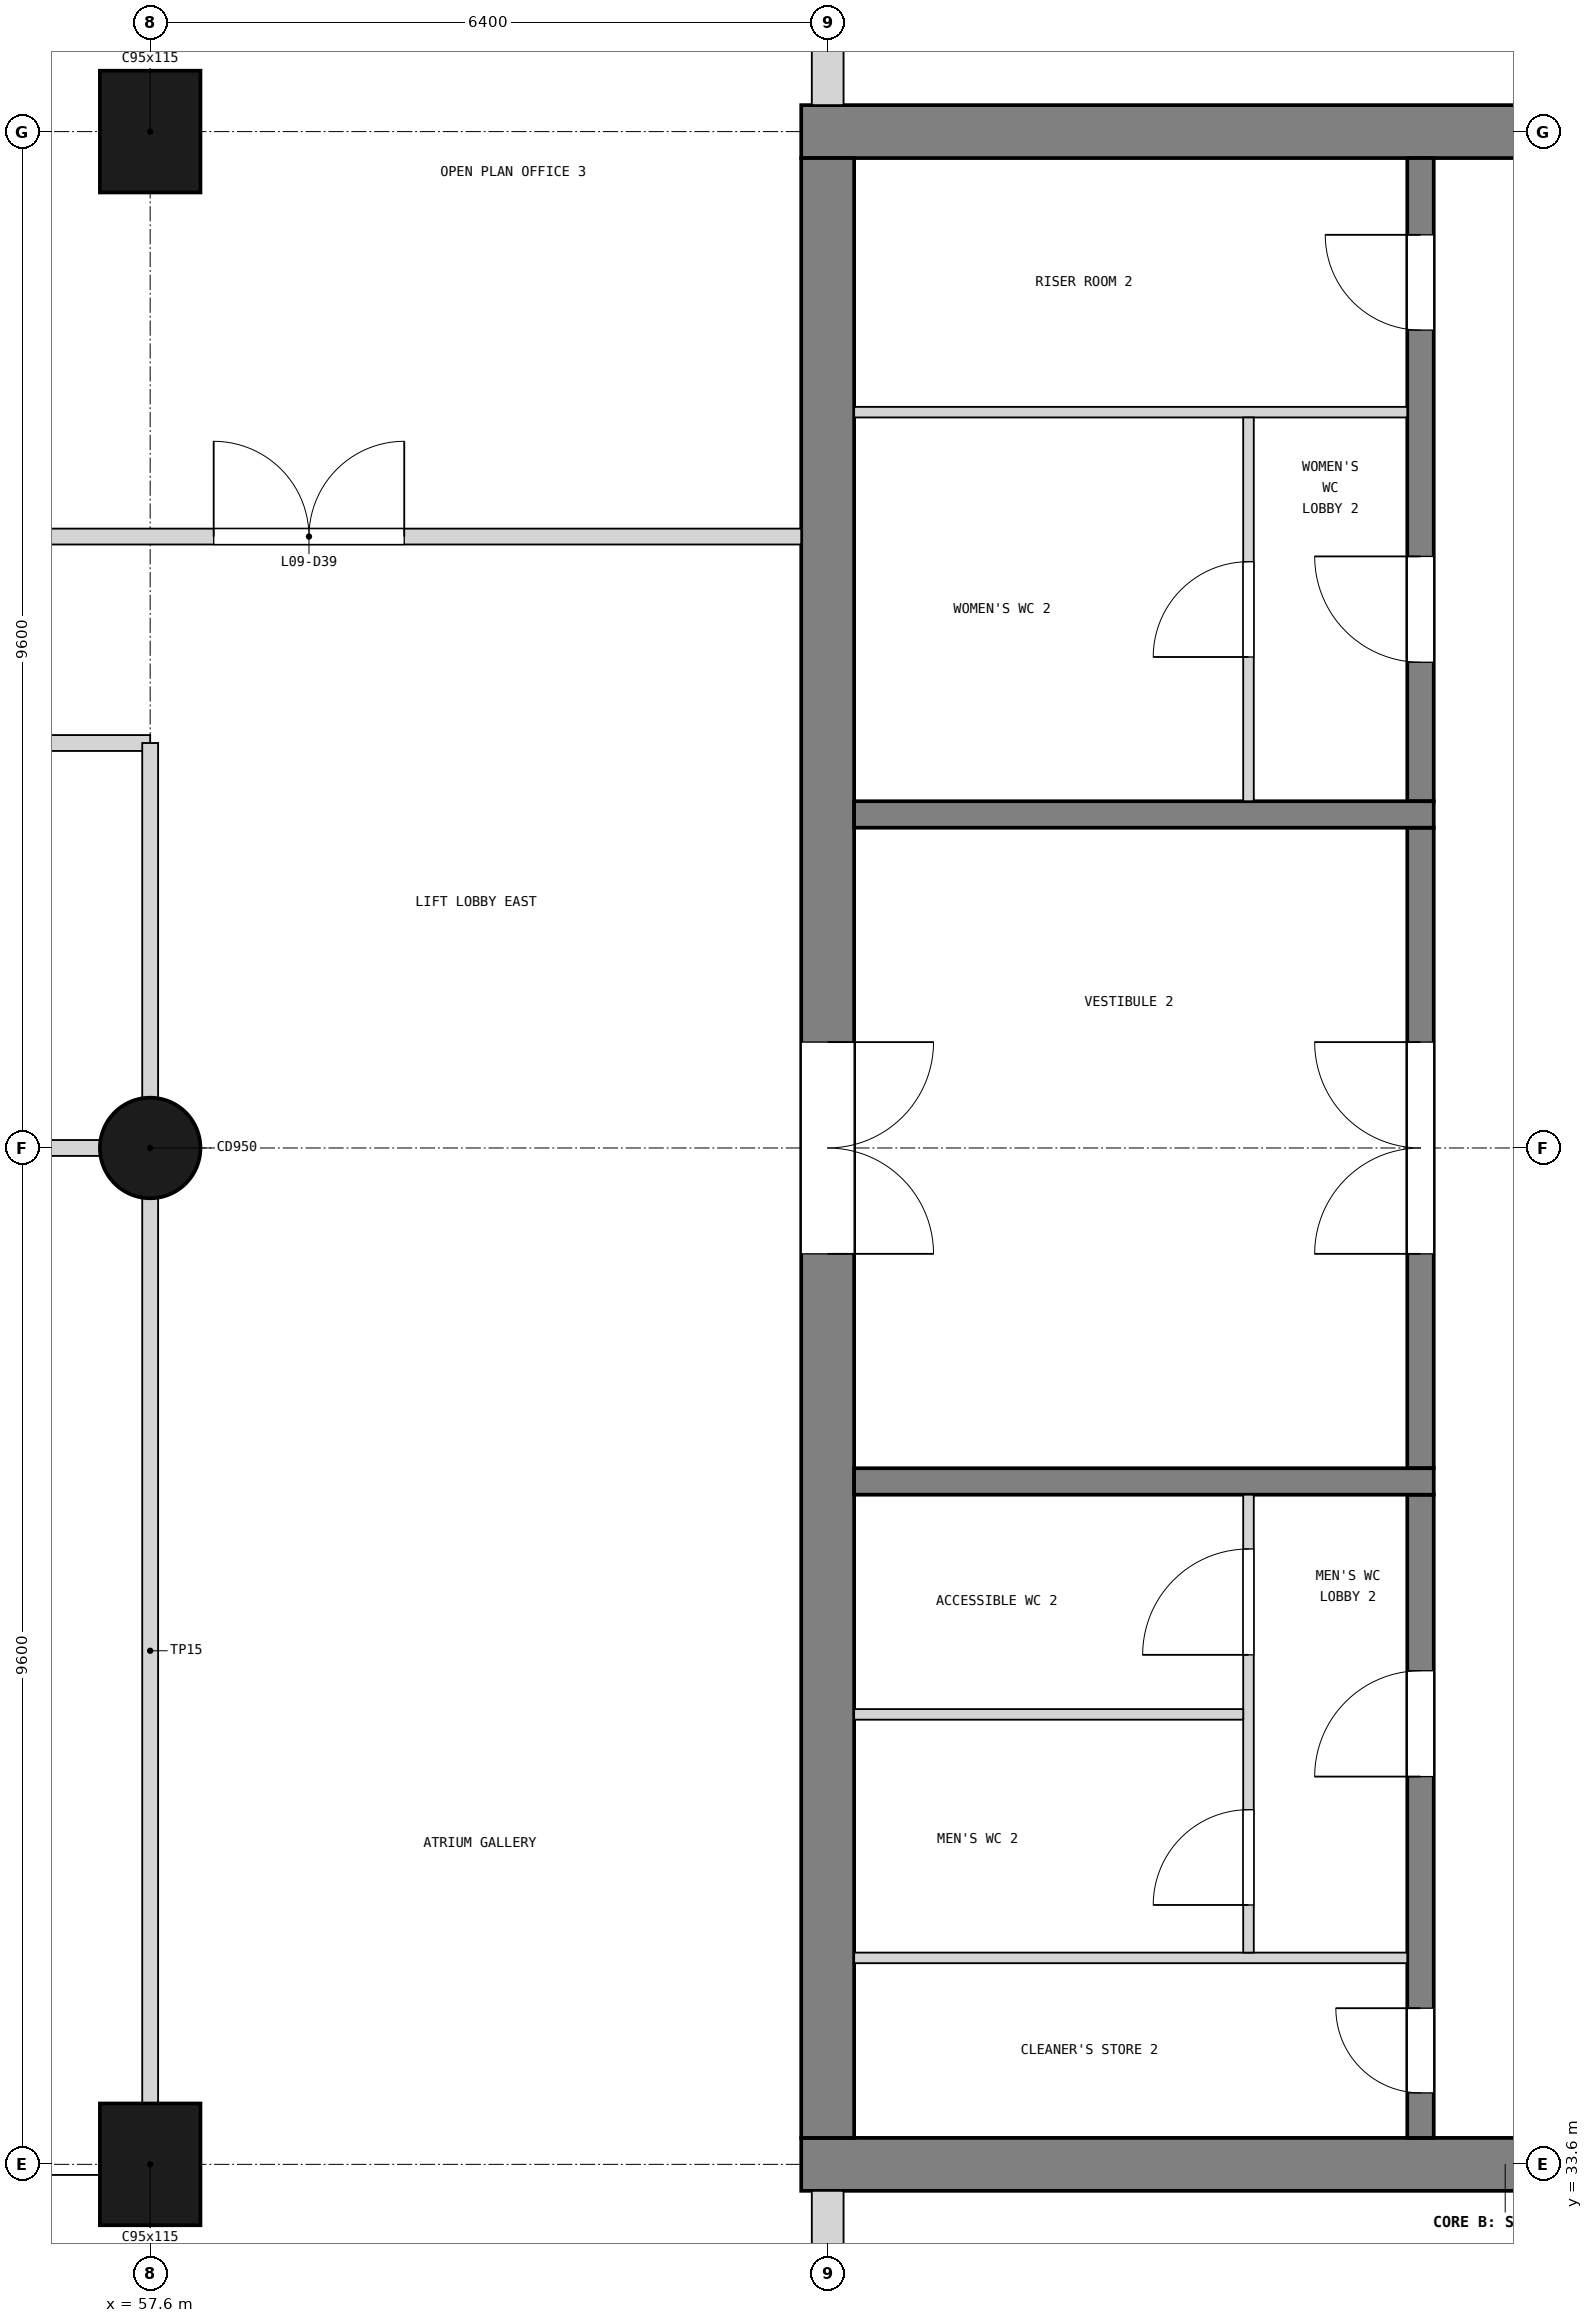
"""IFC4 building model, lengths in metres.
Left out: names, types, materials, properties, quantities, classifications, styles, units other than length and angle.
Written with IfcOpenShell. Run it as: python <this file> out.ifc"""

import sys

from ifc_helpers import new_model, si_unit, direction, frame, frame_2d, origin, origin_2d, place, context, subcontext, project, spatial, rectangle, circle, extrude, element, fill, save


model = new_model("IFC4")
c1 = context("Model", 3, precision=1e-05, world=origin(), true_north=direction((0.0, 1.0)))
c2 = subcontext(c1, "Body", "Model", "MODEL_VIEW")
j1 = project(units=[si_unit("LENGTHUNIT", "METRE"), si_unit("PLANEANGLEUNIT", "RADIAN")], contexts=[c1])
p1 = place(None, origin())
s1 = spatial("IfcSite", under=j1, at=p1, CompositionType="ELEMENT")
p2 = place(p1, origin())
s2 = spatial("IfcBuilding", under=s1, at=p2, CompositionType="ELEMENT")
p3 = place(p2, frame((0.0, 0.0, 36.6)))
s3 = spatial("IfcBuildingStorey", under=s2, at=p3, CompositionType="ELEMENT", Elevation=36.6)
p4 = place(p3, frame((63.75, 52.8, 0.0), z_axis=(0.0, 0.0, 1.0), x_axis=(1.0, 0.0, 0.0)))
e1 = element("IfcWall", 1, at=p4, inside=s3, PredefinedType="SHEAR", context=c2, shape_type="SweptSolid", body=[
    extrude(rectangle(XDim=13.3, YDim=0.5, at=frame_2d((6.65, 0.0))), origin(), (0.0, 0.0, 1.0), 3.9),
])
p5 = place(p4, frame((11.05, 0.0, 1.0)))
e2 = element("IfcOpeningElement", 2, at=p5, cuts=e1, PredefinedType="OPENING", context=c2, shape_type="SweptSolid", body=[
    extrude(rectangle(XDim=0.4, YDim=2.0, at=frame_2d((0.2, 1.0))), frame((0.0, 0.26, 0.0), z_axis=(0.0, -1.0, 0.0), x_axis=(1.0, 0.0, 0.0)), (0.0, 0.0, 1.0), 0.52),
])
p6 = place(p3, frame((63.75, 33.6, 0.0), z_axis=(0.0, 0.0, 1.0), x_axis=(1.0, 0.0, 0.0)))
e3 = element("IfcWall", 3, at=p6, inside=s3, PredefinedType="SHEAR", context=c2, shape_type="SweptSolid", body=[
    extrude(rectangle(XDim=13.3, YDim=0.5, at=frame_2d((6.65, 0.0))), origin(), (0.0, 0.0, 1.0), 3.9),
])
p7 = place(p6, frame((11.05, 0.0, 1.0)))
e4 = element("IfcOpeningElement", 4, at=p7, cuts=e3, PredefinedType="OPENING", context=c2, shape_type="SweptSolid", body=[
    extrude(rectangle(XDim=0.4, YDim=2.0, at=frame_2d((0.2, 1.0))), frame((0.0, 0.26, 0.0), z_axis=(0.0, -1.0, 0.0), x_axis=(1.0, 0.0, 0.0)), (0.0, 0.0, 1.0), 0.52),
])
p8 = place(p3, frame((64.0, 33.85, 0.0), z_axis=(0.0, 0.0, 1.0), x_axis=(0.0, 1.0, 0.0)))
e5 = element("IfcWall", 5, at=p8, inside=s3, PredefinedType="SHEAR", context=c2, shape_type="SweptSolid", body=[
    extrude(rectangle(XDim=18.7, YDim=0.5, at=frame_2d((9.35, 0.0))), origin(), (0.0, 0.0, 1.0), 3.9),
])
p9 = place(p8, frame((8.35, 0.0, 0.0)))
e6 = element("IfcOpeningElement", 6, at=p9, cuts=e5, PredefinedType="OPENING", context=c2, shape_type="SweptSolid", body=[
    extrude(rectangle(XDim=2.0, YDim=2.1, at=frame_2d((1.0, 1.05))), frame((0.0, 0.26, 0.0), z_axis=(0.0, -1.0, 0.0), x_axis=(1.0, 0.0, 0.0)), (0.0, 0.0, 1.0), 0.52),
])
p10 = place(p3, frame((57.6, 33.6, 0.0), z_axis=(0.0, 0.0, 1.0), x_axis=(1.0, 0.0, 0.0)))
e7 = element("IfcColumn", 7, at=p10, inside=s3, PredefinedType="COLUMN", context=c2, shape_type="SweptSolid", body=[
    extrude(rectangle(XDim=0.95, YDim=1.15, at=origin_2d()), origin(), (0.0, 0.0, 1.0), 3.9),
])
p11 = place(p3, frame((57.6, 43.2, 0.0), z_axis=(0.0, 0.0, 1.0), x_axis=(1.0, 0.0, 0.0)))
e8 = element("IfcColumn", 8, at=p11, inside=s3, PredefinedType="COLUMN", context=c2, shape_type="SweptSolid", body=[
    extrude(circle(Radius=0.475, at=origin_2d()), origin(), (0.0, 0.0, 1.0), 3.9),
])
p12 = place(p3, frame((57.6, 52.8, 0.0), z_axis=(0.0, 0.0, 1.0), x_axis=(1.0, 0.0, 0.0)))
e9 = element("IfcColumn", 9, at=p12, inside=s3, PredefinedType="COLUMN", context=c2, shape_type="SweptSolid", body=[
    extrude(rectangle(XDim=0.95, YDim=1.15, at=origin_2d()), origin(), (0.0, 0.0, 1.0), 3.9),
])
p13 = place(p3, frame((64.0, 31.0, 0.0), z_axis=(0.0, 0.0, 1.0), x_axis=(0.0, 1.0, 0.0)))
e10 = element("IfcWall", 10, at=p13, inside=s3, PredefinedType="SOLIDWALL", context=c2, shape_type="SweptSolid", body=[
    extrude(rectangle(XDim=2.35, YDim=0.3, at=frame_2d((1.175, 0.0))), origin(), (0.0, 0.0, 1.0), 2.88),
])
p14 = place(p3, frame((64.0, 53.05, 0.0), z_axis=(0.0, 0.0, 1.0), x_axis=(0.0, 1.0, 0.0)))
e11 = element("IfcWall", 11, at=p14, inside=s3, PredefinedType="SOLIDWALL", context=c2, shape_type="SweptSolid", body=[
    extrude(rectangle(XDim=2.35, YDim=0.3, at=frame_2d((1.175, 0.0))), origin(), (0.0, 0.0, 1.0), 2.88),
])
p15 = place(p3, frame((69.6, 33.85, 0.0), z_axis=(0.0, 0.0, 1.0), x_axis=(0.0, 1.0, 0.0)))
e12 = element("IfcWall", 12, at=p15, inside=s3, PredefinedType="SOLIDWALL", context=c2, shape_type="SweptSolid", body=[
    extrude(rectangle(XDim=6.075, YDim=0.25, at=frame_2d((3.038, 0.0))), origin(), (0.0, 0.0, 1.0), 3.6),
])
p16 = place(p15, frame((0.425, 0.0, 0.0)))
e13 = element("IfcOpeningElement", 13, at=p16, cuts=e12, PredefinedType="OPENING", context=c2, shape_type="SweptSolid", body=[
    extrude(rectangle(XDim=0.8, YDim=2.1, at=frame_2d((0.4, 1.05))), frame((0.0, 0.135, 0.0), z_axis=(0.0, -1.0, 0.0), x_axis=(1.0, 0.0, 0.0)), (0.0, 0.0, 1.0), 0.27),
])
p17 = place(p15, frame((3.413, 0.0, 0.0)))
e14 = element("IfcOpeningElement", 14, at=p17, cuts=e12, PredefinedType="OPENING", context=c2, shape_type="SweptSolid", body=[
    extrude(rectangle(XDim=1.0, YDim=2.1, at=frame_2d((0.5, 1.05))), frame((0.0, 0.135, 0.0), z_axis=(0.0, -1.0, 0.0), x_axis=(1.0, 0.0, 0.0)), (0.0, 0.0, 1.0), 0.27),
])
p18 = place(p3, frame((69.6, 40.175, 0.0), z_axis=(0.0, 0.0, 1.0), x_axis=(0.0, 1.0, 0.0)))
e15 = element("IfcWall", 15, at=p18, inside=s3, PredefinedType="SOLIDWALL", context=c2, shape_type="SweptSolid", body=[
    extrude(rectangle(XDim=6.05, YDim=0.25, at=frame_2d((3.025, 0.0))), origin(), (0.0, 0.0, 1.0), 3.6),
])
p19 = place(p18, frame((2.025, 0.0, 0.0)))
e16 = element("IfcOpeningElement", 16, at=p19, cuts=e15, PredefinedType="OPENING", context=c2, shape_type="SweptSolid", body=[
    extrude(rectangle(XDim=2.0, YDim=2.1, at=frame_2d((1.0, 1.05))), frame((0.0, 0.135, 0.0), z_axis=(0.0, -1.0, 0.0), x_axis=(1.0, 0.0, 0.0)), (0.0, 0.0, 1.0), 0.27),
])
p20 = place(p3, frame((69.6, 46.475, 0.0), z_axis=(0.0, 0.0, 1.0), x_axis=(0.0, 1.0, 0.0)))
e17 = element("IfcWall", 17, at=p20, inside=s3, PredefinedType="SOLIDWALL", context=c2, shape_type="SweptSolid", body=[
    extrude(rectangle(XDim=6.075, YDim=0.25, at=frame_2d((3.038, 0.0))), origin(), (0.0, 0.0, 1.0), 3.6),
])
p21 = place(p20, frame((1.312, 0.0, 0.0)))
e18 = element("IfcOpeningElement", 18, at=p21, cuts=e17, PredefinedType="OPENING", context=c2, shape_type="SweptSolid", body=[
    extrude(rectangle(XDim=1.0, YDim=2.1, at=frame_2d((0.5, 1.05))), frame((0.0, 0.135, 0.0), z_axis=(0.0, -1.0, 0.0), x_axis=(1.0, 0.0, 0.0)), (0.0, 0.0, 1.0), 0.27),
])
p22 = place(p20, frame((4.45, 0.0, 0.0)))
e19 = element("IfcOpeningElement", 19, at=p22, cuts=e17, PredefinedType="OPENING", context=c2, shape_type="SweptSolid", body=[
    extrude(rectangle(XDim=0.9, YDim=2.1, at=frame_2d((0.45, 1.05))), frame((0.0, 0.135, 0.0), z_axis=(0.0, -1.0, 0.0), x_axis=(1.0, 0.0, 0.0)), (0.0, 0.0, 1.0), 0.27),
])
for number, where, z_axis, x_axis in (
    (20, (69.725, 40.05, 0.0), (0.0, 0.0, 1.0), (-1.0, 0.0, 0.0)),
    (21, (69.725, 46.35, 0.0), (0.0, 0.0, 1.0), (-1.0, 0.0, 0.0)),
):
    element("IfcWall", number, at=place(p3, frame(where, z_axis=z_axis, x_axis=x_axis)), inside=s3, PredefinedType="SOLIDWALL", context=c2, shape_type="SweptSolid", body=[
        extrude(rectangle(XDim=5.475, YDim=0.25, at=frame_2d((2.738, 0.0))), origin(), (0.0, 0.0, 1.0), 3.6),
    ])
p23 = place(p3, frame((69.475, 35.55, 0.0), z_axis=(0.0, 0.0, 1.0), x_axis=(-1.0, 0.0, 0.0)))
e22 = element("IfcWall", 22, at=p23, inside=s3, PredefinedType="PARTITIONING", context=c2, shape_type="SweptSolid", body=[
    extrude(rectangle(XDim=5.225, YDim=0.1, at=frame_2d((2.613, 0.0))), origin(), (0.0, 0.0, 1.0), 3.6),
])
p24 = place(p3, frame((67.975, 35.6, 0.0), z_axis=(0.0, 0.0, 1.0), x_axis=(0.0, 1.0, 0.0)))
e23 = element("IfcWall", 23, at=p24, inside=s3, PredefinedType="PARTITIONING", context=c2, shape_type="SweptSolid", body=[
    extrude(rectangle(XDim=4.325, YDim=0.1, at=frame_2d((2.163, 0.0))), origin(), (0.0, 0.0, 1.0), 3.6),
])
p25 = place(p24, frame((0.45, 0.0, 0.0)))
e24 = element("IfcOpeningElement", 24, at=p25, cuts=e23, PredefinedType="OPENING", context=c2, shape_type="SweptSolid", body=[
    extrude(rectangle(XDim=0.9, YDim=2.1, at=frame_2d((0.45, 1.05))), frame((0.0, 0.06, 0.0), z_axis=(0.0, -1.0, 0.0), x_axis=(1.0, 0.0, 0.0)), (0.0, 0.0, 1.0), 0.12),
])
p26 = place(p24, frame((2.812, 0.0, 0.0)))
e25 = element("IfcOpeningElement", 25, at=p26, cuts=e23, PredefinedType="OPENING", context=c2, shape_type="SweptSolid", body=[
    extrude(rectangle(XDim=1.0, YDim=2.1, at=frame_2d((0.5, 1.05))), frame((0.0, 0.06, 0.0), z_axis=(0.0, -1.0, 0.0), x_axis=(1.0, 0.0, 0.0)), (0.0, 0.0, 1.0), 0.12),
])
p27 = place(p3, frame((67.925, 37.85, 0.0), z_axis=(0.0, 0.0, 1.0), x_axis=(-1.0, 0.0, 0.0)))
e26 = element("IfcWall", 26, at=p27, inside=s3, PredefinedType="PARTITIONING", context=c2, shape_type="SweptSolid", body=[
    extrude(rectangle(XDim=3.675, YDim=0.1, at=frame_2d((1.837, 0.0))), origin(), (0.0, 0.0, 1.0), 3.6),
])
p28 = place(p3, frame((69.475, 50.15, 0.0), z_axis=(0.0, 0.0, 1.0), x_axis=(-1.0, 0.0, 0.0)))
e27 = element("IfcWall", 27, at=p28, inside=s3, PredefinedType="PARTITIONING", context=c2, shape_type="SweptSolid", body=[
    extrude(rectangle(XDim=5.225, YDim=0.1, at=frame_2d((2.613, 0.0))), origin(), (0.0, 0.0, 1.0), 3.6),
])
p29 = place(p3, frame((67.975, 46.475, 0.0), z_axis=(0.0, 0.0, 1.0), x_axis=(0.0, 1.0, 0.0)))
e28 = element("IfcWall", 28, at=p29, inside=s3, PredefinedType="PARTITIONING", context=c2, shape_type="SweptSolid", body=[
    extrude(rectangle(XDim=3.625, YDim=0.1, at=frame_2d((1.812, 0.0))), origin(), (0.0, 0.0, 1.0), 3.6),
])
p30 = place(p29, frame((1.363, 0.0, 0.0)))
e29 = element("IfcOpeningElement", 29, at=p30, cuts=e28, PredefinedType="OPENING", context=c2, shape_type="SweptSolid", body=[
    extrude(rectangle(XDim=0.9, YDim=2.1, at=frame_2d((0.45, 1.05))), frame((0.0, 0.06, 0.0), z_axis=(0.0, -1.0, 0.0), x_axis=(1.0, 0.0, 0.0)), (0.0, 0.0, 1.0), 0.12),
])
p31 = place(p3, frame((52.89, 47.025, 0.0), z_axis=(0.0, 0.0, 1.0), x_axis=(1.0, 0.0, 0.0)))
e30 = element("IfcWall", 30, at=p31, inside=s3, PredefinedType="PARTITIONING", context=c2, shape_type="SweptSolid", body=[
    extrude(rectangle(XDim=4.71, YDim=0.15, at=frame_2d((2.355, 0.0))), origin(), (0.0, 0.0, 1.0), 3.68),
])
p32 = place(p31, frame((1.86, 0.0, 0.0)))
e31 = element("IfcOpeningElement", 31, at=p32, cuts=e30, PredefinedType="OPENING", context=c2, shape_type="SweptSolid", body=[
    extrude(rectangle(XDim=1.0, YDim=2.1, at=frame_2d((0.5, 1.05))), frame((0.0, 0.085, 0.0), z_axis=(0.0, -1.0, 0.0), x_axis=(1.0, 0.0, 0.0)), (0.0, 0.0, 1.0), 0.17),
])
p33 = place(p3, frame((54.4, 48.975, 0.0), z_axis=(0.0, 0.0, 1.0), x_axis=(1.0, 0.0, 0.0)))
e32 = element("IfcWall", 32, at=p33, inside=s3, PredefinedType="PARTITIONING", context=c2, shape_type="SweptSolid", body=[
    extrude(rectangle(XDim=9.35, YDim=0.15, at=frame_2d((4.675, 0.0))), origin(), (0.0, 0.0, 1.0), 3.68),
])
p34 = place(p33, frame((3.8, 0.0, 0.0)))
e33 = element("IfcOpeningElement", 33, at=p34, cuts=e32, PredefinedType="OPENING", context=c2, shape_type="SweptSolid", body=[
    extrude(rectangle(XDim=1.8, YDim=2.1, at=frame_2d((0.9, 1.05))), frame((0.0, 0.085, 0.0), z_axis=(0.0, -1.0, 0.0), x_axis=(1.0, 0.0, 0.0)), (0.0, 0.0, 1.0), 0.17),
])
p35 = place(p3, frame((57.6, 33.6, 0.0), z_axis=(0.0, 0.0, 1.0), x_axis=(0.0, 1.0, 0.0)))
e34 = element("IfcWall", 34, at=p35, inside=s3, PredefinedType="PARTITIONING", context=c2, shape_type="SweptSolid", body=[
    extrude(rectangle(XDim=13.425, YDim=0.15, at=frame_2d((6.712, 0.0))), origin(), (0.0, 0.0, 1.0), 2.78),
])
p36 = place(p3, frame((32.0, 43.2, 0.0), z_axis=(0.0, 0.0, 1.0), x_axis=(1.0, 0.0, 0.0)))
e35 = element("IfcWall", 35, at=p36, inside=s3, PredefinedType="PARTITIONING", context=c2, shape_type="SweptSolid", body=[
    extrude(rectangle(XDim=25.6, YDim=0.15, at=frame_2d((12.8, 0.0))), origin(), (0.0, 0.0, 1.0), 2.88),
])
p37 = place(p19, origin())
e36 = element("IfcDoor", 36, at=p37, inside=s3, OperationType="DOUBLE_DOOR_SINGLE_SWING", PredefinedType="DOOR", context=c2, shape_type="SweptSolid", body=[
    extrude(rectangle(XDim=2.0, YDim=2.1, at=frame_2d((1.0, 1.05))), frame((0.0, 0.025, 0.0), z_axis=(0.0, -1.0, 0.0), x_axis=(1.0, 0.0, 0.0)), (0.0, 0.0, 1.0), 0.05),
])
fill(e16, e36)
p38 = place(p9, frame((2.0, 0.0, 0.0), z_axis=(0.0, 0.0, 1.0), x_axis=(-1.0, 0.0, 0.0)))
e37 = element("IfcDoor", 37, at=p38, inside=s3, OperationType="DOUBLE_DOOR_SINGLE_SWING", PredefinedType="DOOR", context=c2, shape_type="SweptSolid", body=[
    extrude(rectangle(XDim=2.0, YDim=2.1, at=frame_2d((1.0, 1.05))), frame((0.0, 0.025, 0.0), z_axis=(0.0, -1.0, 0.0), x_axis=(1.0, 0.0, 0.0)), (0.0, 0.0, 1.0), 0.05),
])
fill(e6, e37)
p39 = place(p16, origin())
e38 = element("IfcDoor", 38, at=p39, inside=s3, OperationType="SINGLE_SWING_RIGHT", PredefinedType="DOOR", context=c2, shape_type="SweptSolid", body=[
    extrude(rectangle(XDim=0.8, YDim=2.1, at=frame_2d((0.4, 1.05))), frame((0.0, 0.025, 0.0), z_axis=(0.0, -1.0, 0.0), x_axis=(1.0, 0.0, 0.0)), (0.0, 0.0, 1.0), 0.05),
])
fill(e13, e38)
p40 = place(p17, origin())
e39 = element("IfcDoor", 39, at=p40, inside=s3, OperationType="SINGLE_SWING_LEFT", PredefinedType="DOOR", context=c2, shape_type="SweptSolid", body=[
    extrude(rectangle(XDim=1.0, YDim=2.1, at=frame_2d((0.5, 1.05))), frame((0.0, 0.025, 0.0), z_axis=(0.0, -1.0, 0.0), x_axis=(1.0, 0.0, 0.0)), (0.0, 0.0, 1.0), 0.05),
])
fill(e14, e39)
p41 = place(p25, origin())
e40 = element("IfcDoor", 40, at=p41, inside=s3, OperationType="SINGLE_SWING_LEFT", PredefinedType="DOOR", context=c2, shape_type="SweptSolid", body=[
    extrude(rectangle(XDim=0.9, YDim=2.1, at=frame_2d((0.45, 1.05))), frame((0.0, 0.025, 0.0), z_axis=(0.0, -1.0, 0.0), x_axis=(1.0, 0.0, 0.0)), (0.0, 0.0, 1.0), 0.05),
])
fill(e24, e40)
p42 = place(p26, origin())
e41 = element("IfcDoor", 41, at=p42, inside=s3, OperationType="SINGLE_SWING_LEFT", PredefinedType="DOOR", context=c2, shape_type="SweptSolid", body=[
    extrude(rectangle(XDim=1.0, YDim=2.1, at=frame_2d((0.5, 1.05))), frame((0.0, 0.025, 0.0), z_axis=(0.0, -1.0, 0.0), x_axis=(1.0, 0.0, 0.0)), (0.0, 0.0, 1.0), 0.05),
])
fill(e25, e41)
p43 = place(p21, origin())
e42 = element("IfcDoor", 42, at=p43, inside=s3, OperationType="SINGLE_SWING_RIGHT", PredefinedType="DOOR", context=c2, shape_type="SweptSolid", body=[
    extrude(rectangle(XDim=1.0, YDim=2.1, at=frame_2d((0.5, 1.05))), frame((0.0, 0.025, 0.0), z_axis=(0.0, -1.0, 0.0), x_axis=(1.0, 0.0, 0.0)), (0.0, 0.0, 1.0), 0.05),
])
fill(e18, e42)
p44 = place(p30, origin())
e43 = element("IfcDoor", 43, at=p44, inside=s3, OperationType="SINGLE_SWING_LEFT", PredefinedType="DOOR", context=c2, shape_type="SweptSolid", body=[
    extrude(rectangle(XDim=0.9, YDim=2.1, at=frame_2d((0.45, 1.05))), frame((0.0, 0.025, 0.0), z_axis=(0.0, -1.0, 0.0), x_axis=(1.0, 0.0, 0.0)), (0.0, 0.0, 1.0), 0.05),
])
fill(e29, e43)
p45 = place(p22, origin())
e44 = element("IfcDoor", 44, at=p45, inside=s3, OperationType="SINGLE_SWING_RIGHT", PredefinedType="DOOR", context=c2, shape_type="SweptSolid", body=[
    extrude(rectangle(XDim=0.9, YDim=2.1, at=frame_2d((0.45, 1.05))), frame((0.0, 0.025, 0.0), z_axis=(0.0, -1.0, 0.0), x_axis=(1.0, 0.0, 0.0)), (0.0, 0.0, 1.0), 0.05),
])
fill(e19, e44)
p46 = place(p34, origin())
e45 = element("IfcDoor", 45, at=p46, inside=s3, OperationType="DOUBLE_DOOR_SINGLE_SWING", PredefinedType="DOOR", context=c2, shape_type="SweptSolid", body=[
    extrude(rectangle(XDim=1.8, YDim=2.1, at=frame_2d((0.9, 1.05))), frame((0.0, 0.025, 0.0), z_axis=(0.0, -1.0, 0.0), x_axis=(1.0, 0.0, 0.0)), (0.0, 0.0, 1.0), 0.05),
])
fill(e33, e45)
save(model, sys.argv[1])
